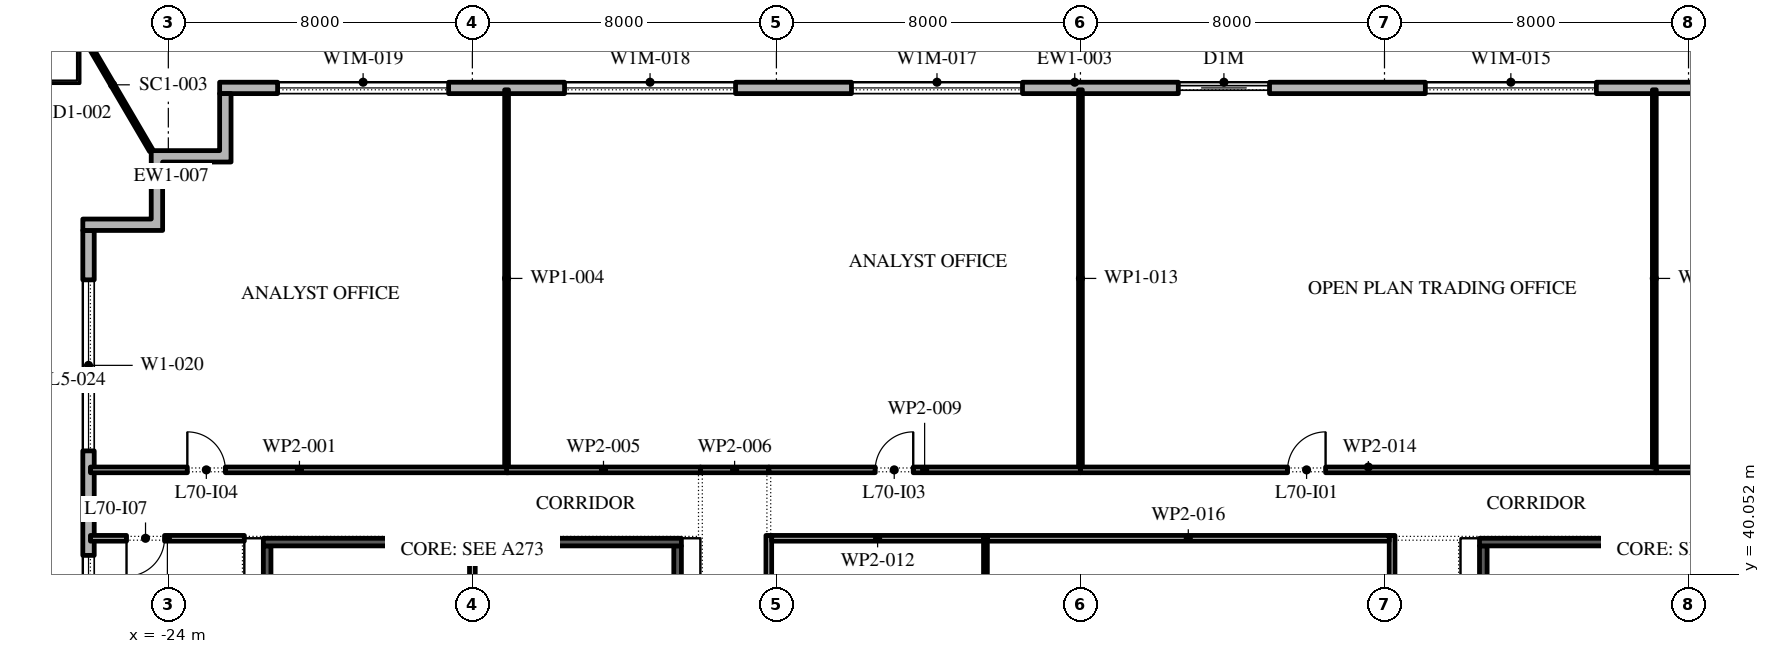
"""IFC4 building model, lengths in metres.
Left out: names, types, materials, properties, quantities, classifications, styles, units other than length and angle.
Written with IfcOpenShell. Run it as: python <this file> out.ifc"""

import sys

from ifc_helpers import new_model, si_unit, direction, frame, frame_2d, origin, place, context, subcontext, project, spatial, polyline, rectangle, outline, extrude, element, fill, save


model = new_model("IFC4")
c1 = context("Model", 3, precision=1e-05, world=origin(), true_north=direction((0.0, 1.0)))
c2 = subcontext(c1, "Body", "Model", "MODEL_VIEW")
j1 = project(units=[si_unit("LENGTHUNIT", "METRE"), si_unit("PLANEANGLEUNIT", "RADIAN")], contexts=[c1])
p1 = place(None, origin())
s1 = spatial("IfcSite", under=j1, at=p1, CompositionType="ELEMENT")
p2 = place(p1, origin())
s2 = spatial("IfcBuilding", under=s1, at=p2, CompositionType="ELEMENT")
p3 = place(p2, frame((0.0, 0.0, 321.6)))
s3 = spatial("IfcBuildingStorey", under=s2, at=p3, CompositionType="ELEMENT", Elevation=321.6)
p4 = place(p3, frame((22.35, 52.85, 0.0), z_axis=(0.0, 0.0, 1.0), x_axis=(-1.0, 0.0, 0.0)))
e1 = element("IfcWall", 1, at=p4, inside=s3, PredefinedType="STANDARD", context=c2, shape_type="SweptSolid", body=[
    extrude(rectangle(XDim=45.0, YDim=0.3, at=frame_2d((22.5, 0.0))), origin(), (0.0, 0.0, 1.0), 4.0),
])
p5 = place(p4, frame((1.375, 0.0, 0.45)))
e2 = element("IfcOpeningElement", 2, at=p5, cuts=e1, PredefinedType="OPENING", context=c2, shape_type="SweptSolid", body=[
    extrude(rectangle(XDim=4.5, YDim=2.575, at=frame_2d((2.25, 1.288))), frame((0.0, 0.16, 0.0), z_axis=(0.0, -1.0, 0.0), x_axis=(1.0, 0.0, 0.0)), (0.0, 0.0, 1.0), 0.32),
])
p6 = place(p4, frame((8.775, 0.0, 0.45)))
e3 = element("IfcOpeningElement", 3, at=p6, cuts=e1, PredefinedType="OPENING", context=c2, shape_type="SweptSolid", body=[
    extrude(rectangle(XDim=4.5, YDim=2.575, at=frame_2d((2.25, 1.288))), frame((0.0, 0.16, 0.0), z_axis=(0.0, -1.0, 0.0), x_axis=(1.0, 0.0, 0.0)), (0.0, 0.0, 1.0), 0.32),
])
p7 = place(p4, frame((17.375, 0.0, 0.0)))
e4 = element("IfcOpeningElement", 4, at=p7, cuts=e1, PredefinedType="OPENING", context=c2, shape_type="SweptSolid", body=[
    extrude(rectangle(XDim=2.4, YDim=3.025, at=frame_2d((1.2, 1.512))), frame((0.0, 0.16, 0.0), z_axis=(0.0, -1.0, 0.0), x_axis=(1.0, 0.0, 0.0)), (0.0, 0.0, 1.0), 0.32),
])
p8 = place(p4, frame((23.875, 0.0, 0.45)))
e5 = element("IfcOpeningElement", 5, at=p8, cuts=e1, PredefinedType="OPENING", context=c2, shape_type="SweptSolid", body=[
    extrude(rectangle(XDim=4.5, YDim=2.575, at=frame_2d((2.25, 1.288))), frame((0.0, 0.16, 0.0), z_axis=(0.0, -1.0, 0.0), x_axis=(1.0, 0.0, 0.0)), (0.0, 0.0, 1.0), 0.32),
])
p9 = place(p4, frame((31.425, 0.0, 0.45)))
e6 = element("IfcOpeningElement", 6, at=p9, cuts=e1, PredefinedType="OPENING", context=c2, shape_type="SweptSolid", body=[
    extrude(rectangle(XDim=4.5, YDim=2.575, at=frame_2d((2.25, 1.288))), frame((0.0, 0.16, 0.0), z_axis=(0.0, -1.0, 0.0), x_axis=(1.0, 0.0, 0.0)), (0.0, 0.0, 1.0), 0.32),
])
p10 = place(p4, frame((38.975, 0.0, 0.45)))
e7 = element("IfcOpeningElement", 7, at=p10, cuts=e1, PredefinedType="OPENING", context=c2, shape_type="SweptSolid", body=[
    extrude(rectangle(XDim=4.5, YDim=2.575, at=frame_2d((2.25, 1.288))), frame((0.0, 0.16, 0.0), z_axis=(0.0, -1.0, 0.0), x_axis=(1.0, 0.0, 0.0)), (0.0, 0.0, 1.0), 0.32),
])
p11 = place(p3, frame((-26.1, 49.1, 0.0), z_axis=(0.0, 0.0, 1.0), x_axis=(0.0, -1.0, 0.0)))
e8 = element("IfcWall", 8, at=p11, inside=s3, PredefinedType="STANDARD", context=c2, shape_type="SweptSolid", body=[
    extrude(rectangle(XDim=51.5, YDim=0.3, at=frame_2d((25.75, 0.0))), origin(), (0.0, 0.0, 1.0), 4.0),
])
p12 = place(p11, frame((1.3, 0.0, 0.45)))
e9 = element("IfcOpeningElement", 9, at=p12, cuts=e8, PredefinedType="OPENING", context=c2, shape_type="SweptSolid", body=[
    extrude(rectangle(XDim=4.5, YDim=3.05, at=frame_2d((2.25, 1.525))), frame((0.0, 0.16, 0.0), z_axis=(0.0, -1.0, 0.0), x_axis=(1.0, 0.0, 0.0)), (0.0, 0.0, 1.0), 0.32),
])
p13 = place(p11, frame((8.55, 0.0, 0.45)))
e10 = element("IfcOpeningElement", 10, at=p13, cuts=e8, PredefinedType="OPENING", context=c2, shape_type="SweptSolid", body=[
    extrude(rectangle(XDim=4.5, YDim=3.05, at=frame_2d((2.25, 1.525))), frame((0.0, 0.16, 0.0), z_axis=(0.0, -1.0, 0.0), x_axis=(1.0, 0.0, 0.0)), (0.0, 0.0, 1.0), 0.32),
])
p14 = place(p11, frame((17.0, 0.0, 0.0)))
e11 = element("IfcOpeningElement", 11, at=p14, cuts=e8, PredefinedType="OPENING", context=c2, shape_type="SweptSolid", body=[
    extrude(rectangle(XDim=2.4, YDim=3.5, at=frame_2d((1.2, 1.75))), frame((0.0, 0.16, 0.0), z_axis=(0.0, -1.0, 0.0), x_axis=(1.0, 0.0, 0.0)), (0.0, 0.0, 1.0), 0.32),
])
p15 = place(p11, frame((23.35, 0.0, 0.45)))
e12 = element("IfcOpeningElement", 12, at=p15, cuts=e8, PredefinedType="OPENING", context=c2, shape_type="SweptSolid", body=[
    extrude(rectangle(XDim=4.5, YDim=3.05, at=frame_2d((2.25, 1.525))), frame((0.0, 0.16, 0.0), z_axis=(0.0, -1.0, 0.0), x_axis=(1.0, 0.0, 0.0)), (0.0, 0.0, 1.0), 0.32),
])
p16 = place(p11, frame((30.75, 0.0, 0.45)))
e13 = element("IfcOpeningElement", 13, at=p16, cuts=e8, PredefinedType="OPENING", context=c2, shape_type="SweptSolid", body=[
    extrude(rectangle(XDim=4.5, YDim=3.05, at=frame_2d((2.25, 1.525))), frame((0.0, 0.16, 0.0), z_axis=(0.0, -1.0, 0.0), x_axis=(1.0, 0.0, 0.0)), (0.0, 0.0, 1.0), 0.32),
])
p17 = place(p11, frame((38.15, 0.0, 0.45)))
e14 = element("IfcOpeningElement", 14, at=p17, cuts=e8, PredefinedType="OPENING", context=c2, shape_type="SweptSolid", body=[
    extrude(rectangle(XDim=4.5, YDim=3.05, at=frame_2d((2.25, 1.525))), frame((0.0, 0.16, 0.0), z_axis=(0.0, -1.0, 0.0), x_axis=(1.0, 0.0, 0.0)), (0.0, 0.0, 1.0), 0.32),
])
p18 = place(p11, frame((46.6, 0.0, 0.0)))
e15 = element("IfcOpeningElement", 15, at=p18, cuts=e8, PredefinedType="OPENING", context=c2, shape_type="SweptSolid", body=[
    extrude(rectangle(XDim=2.4, YDim=3.5, at=frame_2d((1.2, 1.75))), frame((0.0, 0.16, 0.0), z_axis=(0.0, -1.0, 0.0), x_axis=(1.0, 0.0, 0.0)), (0.0, 0.0, 1.0), 0.32),
])
p19 = place(p3, origin())
e16 = element("IfcWall", 16, at=p19, inside=s3, PredefinedType="STANDARD", context=c2, shape_type="SweptSolid", body=[
    extrude(outline(polyline([(-24.45, 49.4), (-24.45, 51.2), (-22.65, 51.2), (-22.65, 52.7), (-22.35, 52.7), (-22.35, 50.9), (-24.15, 50.9), (-24.15, 49.1), (-26.25, 49.1), (-26.25, 49.4), (-24.45, 49.4)])), origin(), (0.0, 0.0, 1.0), 4.0),
])
p20 = place(p3, frame((-24.45, 51.2, -0.05), z_axis=(0.0, 0.0, 1.0), x_axis=(-0.506031495682, 0.862515000089, 0.0)))
e17 = element("IfcWall", 17, at=p20, inside=s3, PredefinedType="STANDARD", context=c2, shape_type="SweptSolid", body=[
    extrude(rectangle(XDim=4.016, YDim=0.1, at=frame_2d((2.008, 0.0))), origin(), (0.0, 0.0, 1.0), 4.05),
])
p21 = place(p3, frame((-21.4, 25.75, 0.0), z_axis=(0.0, 0.0, 1.0), x_axis=(0.0, 1.0, 0.0)))
e18 = element("IfcWall", 18, at=p21, inside=s3, PredefinedType="SHEAR", context=c2, shape_type="SweptSolid", body=[
    extrude(rectangle(XDim=15.05, YDim=0.2, at=frame_2d((7.525, 0.0))), origin(), (0.0, 0.0, 1.0), 4.0),
])
p22 = place(p21, frame((7.075, 0.0, 0.0)))
e19 = element("IfcOpeningElement", 19, at=p22, cuts=e18, PredefinedType="OPENING", context=c2, shape_type="SweptSolid", body=[
    extrude(rectangle(XDim=0.9, YDim=2.1, at=frame_2d((0.45, 1.05))), frame((0.0, 0.11, 0.0), z_axis=(0.0, -1.0, 0.0), x_axis=(1.0, 0.0, 0.0)), (0.0, 0.0, 1.0), 0.22),
])
p23 = place(p3, frame((-10.6, 25.75, 0.0), z_axis=(0.0, 0.0, 1.0), x_axis=(0.0, 1.0, 0.0)))
e20 = element("IfcWall", 20, at=p23, inside=s3, PredefinedType="SHEAR", context=c2, shape_type="SweptSolid", body=[
    extrude(rectangle(XDim=15.05, YDim=0.2, at=frame_2d((7.525, 0.0))), origin(), (0.0, 0.0, 1.0), 4.0),
])
p24 = place(p23, frame((7.075, 0.0, 0.0)))
e21 = element("IfcOpeningElement", 21, at=p24, cuts=e20, PredefinedType="OPENING", context=c2, shape_type="SweptSolid", body=[
    extrude(rectangle(XDim=0.9, YDim=2.1, at=frame_2d((0.45, 1.05))), frame((0.0, 0.11, 0.0), z_axis=(0.0, -1.0, 0.0), x_axis=(1.0, 0.0, 0.0)), (0.0, 0.0, 1.0), 0.22),
])
p25 = place(p3, frame((-21.5, 40.9, 0.0), z_axis=(0.0, 0.0, 1.0), x_axis=(1.0, 0.0, 0.0)))
e22 = element("IfcWall", 22, at=p25, inside=s3, PredefinedType="SHEAR", context=c2, shape_type="SweptSolid", body=[
    extrude(rectangle(XDim=11.0, YDim=0.2, at=frame_2d((5.5, 0.0))), origin(), (0.0, 0.0, 1.0), 4.0),
])
p26 = place(p3, frame((-16.0, 25.75, 0.0), z_axis=(0.0, 0.0, 1.0), x_axis=(0.0, 1.0, 0.0)))
e23 = element("IfcWall", 23, at=p26, inside=s3, PredefinedType="PARTITIONING", context=c2, shape_type="SweptSolid", body=[
    extrude(rectangle(XDim=15.05, YDim=0.15, at=frame_2d((7.525, 0.0))), origin(), (0.0, 0.0, 1.0), 4.0),
])
p27 = place(p3, frame((10.6, 25.75, 0.0), z_axis=(0.0, 0.0, 1.0), x_axis=(0.0, 1.0, 0.0)))
e24 = element("IfcWall", 24, at=p27, inside=s3, PredefinedType="SHEAR", context=c2, shape_type="SweptSolid", body=[
    extrude(rectangle(XDim=15.05, YDim=0.2, at=frame_2d((7.525, 0.0))), origin(), (0.0, 0.0, 1.0), 4.0),
])
p28 = place(p27, frame((7.075, 0.0, 0.0)))
e25 = element("IfcOpeningElement", 25, at=p28, cuts=e24, PredefinedType="OPENING", context=c2, shape_type="SweptSolid", body=[
    extrude(rectangle(XDim=0.9, YDim=2.1, at=frame_2d((0.45, 1.05))), frame((0.0, 0.11, 0.0), z_axis=(0.0, -1.0, 0.0), x_axis=(1.0, 0.0, 0.0)), (0.0, 0.0, 1.0), 0.22),
])
p29 = place(p3, frame((10.5, 40.9, 0.0), z_axis=(0.0, 0.0, 1.0), x_axis=(1.0, 0.0, 0.0)))
e26 = element("IfcWall", 26, at=p29, inside=s3, PredefinedType="SHEAR", context=c2, shape_type="SweptSolid", body=[
    extrude(rectangle(XDim=11.0, YDim=0.2, at=frame_2d((5.5, 0.0))), origin(), (0.0, 0.0, 1.0), 4.0),
])
p30 = place(p3, frame((-26.05, 42.8, 0.0), z_axis=(0.0, 0.0, 1.0), x_axis=(1.0, 0.0, 0.0)))
e27 = element("IfcWall", 27, at=p30, inside=s3, PredefinedType="PARTITIONING", context=c2, shape_type="SweptSolid", body=[
    extrude(rectangle(XDim=11.0, YDim=0.15, at=frame_2d((5.5, 0.0))), origin(), (0.0, 0.0, 1.0), 4.0),
])
p31 = place(p30, frame((2.55, 0.0, 0.0)))
e28 = element("IfcOpeningElement", 28, at=p31, cuts=e27, PredefinedType="OPENING", context=c2, shape_type="SweptSolid", body=[
    extrude(rectangle(XDim=1.0, YDim=2.1, at=frame_2d((0.5, 1.05))), frame((0.0, 0.085, 0.0), z_axis=(0.0, -1.0, 0.0), x_axis=(1.0, 0.0, 0.0)), (0.0, 0.0, 1.0), 0.17),
])
p32 = place(p3, frame((-22.0, 41.0, 0.0), z_axis=(0.0, 0.0, 1.0), x_axis=(-1.0, 0.0, 0.0)))
e29 = element("IfcWall", 29, at=p32, inside=s3, PredefinedType="PARTITIONING", context=c2, shape_type="SweptSolid", body=[
    extrude(rectangle(XDim=4.05, YDim=0.15, at=frame_2d((2.025, 0.0))), origin(), (0.0, 0.0, 1.0), 4.0),
])
p33 = place(p32, frame((2.1, 0.0, 0.0)))
e30 = element("IfcOpeningElement", 30, at=p33, cuts=e29, PredefinedType="OPENING", context=c2, shape_type="SweptSolid", body=[
    extrude(rectangle(XDim=1.0, YDim=2.1, at=frame_2d((0.5, 1.05))), frame((0.0, 0.085, 0.0), z_axis=(0.0, -1.0, 0.0), x_axis=(1.0, 0.0, 0.0)), (0.0, 0.0, 1.0), 0.17),
])
p34 = place(p3, frame((-15.1, 42.875, 0.0), z_axis=(0.0, 0.0, 1.0), x_axis=(0.0, 1.0, 0.0)))
e31 = element("IfcWall", 31, at=p34, inside=s3, PredefinedType="PARTITIONING", context=c2, shape_type="SweptSolid", body=[
    extrude(rectangle(XDim=9.925, YDim=0.1, at=frame_2d((4.962, 0.0))), origin(), (0.0, 0.0, 1.0), 4.0),
])
p35 = place(p3, frame((-15.1, 42.8, 0.0), z_axis=(0.0, 0.0, 1.0), x_axis=(1.0, 0.0, 0.0)))
e32 = element("IfcWall", 32, at=p35, inside=s3, PredefinedType="PARTITIONING", context=c2, shape_type="SweptSolid", body=[
    extrude(rectangle(XDim=5.1, YDim=0.15, at=frame_2d((2.55, 0.0))), origin(), (0.0, 0.0, 1.0), 4.0),
])
p36 = place(p3, frame((-10.0, 42.8, 0.0), z_axis=(0.0, 0.0, 1.0), x_axis=(1.0, 0.0, 0.0)))
e33 = element("IfcWall", 33, at=p36, inside=s3, PredefinedType="PARTITIONING", context=c2, shape_type="SweptSolid", body=[
    extrude(rectangle(XDim=1.8, YDim=0.15, at=frame_2d((0.9, 0.0))), origin(), (0.0, 0.0, 1.0), 4.0),
])
p37 = place(p3, frame((-8.2, 41.075, 0.0), z_axis=(0.0, 0.0, 1.0), x_axis=(0.0, -1.0, 0.0)))
e34 = element("IfcWall", 34, at=p37, inside=s3, PredefinedType="PARTITIONING", context=c2, shape_type="SweptSolid", body=[
    extrude(rectangle(XDim=22.0, YDim=0.15, at=frame_2d((11.0, 0.0))), origin(), (0.0, 0.0, 1.0), 4.0),
])
p38 = place(p37, frame((10.675, 0.0, 0.0)))
e35 = element("IfcOpeningElement", 35, at=p38, cuts=e34, PredefinedType="OPENING", context=c2, shape_type="SweptSolid", body=[
    extrude(rectangle(XDim=1.0, YDim=2.1, at=frame_2d((0.5, 1.05))), frame((0.0, 0.085, 0.0), z_axis=(0.0, -1.0, 0.0), x_axis=(1.0, 0.0, 0.0)), (0.0, 0.0, 1.0), 0.17),
])
p39 = place(p3, frame((-8.2, 42.8, 0.0), z_axis=(0.0, 0.0, 1.0), x_axis=(1.0, 0.0, 0.0)))
e36 = element("IfcWall", 36, at=p39, inside=s3, PredefinedType="PARTITIONING", context=c2, shape_type="SweptSolid", body=[
    extrude(rectangle(XDim=8.2, YDim=0.15, at=frame_2d((4.1, 0.0))), origin(), (0.0, 0.0, 1.0), 4.0),
])
p40 = place(p39, frame((2.8, 0.0, 0.0)))
e37 = element("IfcOpeningElement", 37, at=p40, cuts=e36, PredefinedType="OPENING", context=c2, shape_type="SweptSolid", body=[
    extrude(rectangle(XDim=1.0, YDim=2.1, at=frame_2d((0.5, 1.05))), frame((0.0, 0.085, 0.0), z_axis=(0.0, -1.0, 0.0), x_axis=(1.0, 0.0, 0.0)), (0.0, 0.0, 1.0), 0.17),
])
p41 = place(p3, frame((-2.5, 19.075, 0.0), z_axis=(0.0, 0.0, 1.0), x_axis=(0.0, 1.0, 0.0)))
e38 = element("IfcWall", 38, at=p41, inside=s3, PredefinedType="PARTITIONING", context=c2, shape_type="SweptSolid", body=[
    extrude(rectangle(XDim=22.0, YDim=0.1, at=frame_2d((11.0, 0.0))), origin(), (0.0, 0.0, 1.0), 4.0),
])
p42 = place(p3, frame((-2.55, 41.0, 0.0), z_axis=(0.0, 0.0, 1.0), x_axis=(-1.0, 0.0, 0.0)))
e39 = element("IfcWall", 39, at=p42, inside=s3, PredefinedType="PARTITIONING", context=c2, shape_type="SweptSolid", body=[
    extrude(rectangle(XDim=5.575, YDim=0.15, at=frame_2d((2.788, 0.0))), origin(), (0.0, 0.0, 1.0), 4.0),
])
p43 = place(p3, frame((0.0, 42.875, 0.0), z_axis=(0.0, 0.0, 1.0), x_axis=(0.0, 1.0, 0.0)))
e40 = element("IfcWall", 40, at=p43, inside=s3, PredefinedType="PARTITIONING", context=c2, shape_type="SweptSolid", body=[
    extrude(rectangle(XDim=9.925, YDim=0.1, at=frame_2d((4.962, 0.0))), origin(), (0.0, 0.0, 1.0), 4.0),
])
p44 = place(p3, frame((0.0, 42.8, 0.0), z_axis=(0.0, 0.0, 1.0), x_axis=(1.0, 0.0, 0.0)))
e41 = element("IfcWall", 41, at=p44, inside=s3, PredefinedType="PARTITIONING", context=c2, shape_type="SweptSolid", body=[
    extrude(rectangle(XDim=15.15, YDim=0.15, at=frame_2d((7.575, 0.0))), origin(), (0.0, 0.0, 1.0), 4.0),
])
p45 = place(p44, frame((5.45, 0.0, 0.0)))
e42 = element("IfcOpeningElement", 42, at=p45, cuts=e41, PredefinedType="OPENING", context=c2, shape_type="SweptSolid", body=[
    extrude(rectangle(XDim=1.0, YDim=2.1, at=frame_2d((0.5, 1.05))), frame((0.0, 0.085, 0.0), z_axis=(0.0, -1.0, 0.0), x_axis=(1.0, 0.0, 0.0)), (0.0, 0.0, 1.0), 0.17),
])
p46 = place(p3, frame((8.2, 19.075, 0.0), z_axis=(0.0, 0.0, 1.0), x_axis=(0.0, 1.0, 0.0)))
e43 = element("IfcWall", 43, at=p46, inside=s3, PredefinedType="PARTITIONING", context=c2, shape_type="SweptSolid", body=[
    extrude(rectangle(XDim=22.0, YDim=0.15, at=frame_2d((11.0, 0.0))), origin(), (0.0, 0.0, 1.0), 4.0),
])
p47 = place(p46, frame((7.725, 0.0, 0.0)))
e44 = element("IfcOpeningElement", 44, at=p47, cuts=e43, PredefinedType="OPENING", context=c2, shape_type="SweptSolid", body=[
    extrude(rectangle(XDim=1.8, YDim=2.1, at=frame_2d((0.9, 1.05))), frame((0.0, 0.085, 0.0), z_axis=(0.0, -1.0, 0.0), x_axis=(1.0, 0.0, 0.0)), (0.0, 0.0, 1.0), 0.17),
])
p48 = place(p3, frame((8.125, 41.0, 0.0), z_axis=(0.0, 0.0, 1.0), x_axis=(-1.0, 0.0, 0.0)))
e45 = element("IfcWall", 45, at=p48, inside=s3, PredefinedType="PARTITIONING", context=c2, shape_type="SweptSolid", body=[
    extrude(rectangle(XDim=10.575, YDim=0.15, at=frame_2d((5.288, 0.0))), origin(), (0.0, 0.0, 1.0), 4.0),
])
p49 = place(p3, frame((15.15, 42.8, 0.0), z_axis=(0.0, 0.0, 1.0), x_axis=(1.0, 0.0, 0.0)))
e46 = element("IfcWall", 46, at=p49, inside=s3, PredefinedType="PARTITIONING", context=c2, shape_type="SweptSolid", body=[
    extrude(rectangle(XDim=10.9, YDim=0.15, at=frame_2d((5.45, 0.0))), origin(), (0.0, 0.0, 1.0), 4.0),
])
p50 = place(p49, frame((7.2, 0.0, 0.0)))
e47 = element("IfcOpeningElement", 47, at=p50, cuts=e46, PredefinedType="OPENING", context=c2, shape_type="SweptSolid", body=[
    extrude(rectangle(XDim=1.0, YDim=2.1, at=frame_2d((0.5, 1.05))), frame((0.0, 0.085, 0.0), z_axis=(0.0, -1.0, 0.0), x_axis=(1.0, 0.0, 0.0)), (0.0, 0.0, 1.0), 0.17),
])
p51 = place(p3, frame((15.1, 52.8, 0.0), z_axis=(0.0, 0.0, 1.0), x_axis=(0.0, -1.0, 0.0)))
e48 = element("IfcWall", 48, at=p51, inside=s3, PredefinedType="PARTITIONING", context=c2, shape_type="SweptSolid", body=[
    extrude(rectangle(XDim=9.925, YDim=0.1, at=frame_2d((4.962, 0.0))), origin(), (0.0, 0.0, 1.0), 4.0),
])
p52 = place(p6, origin())
e49 = element("IfcWindow", 49, at=p52, inside=s3, PartitioningType="DOUBLE_PANEL_VERTICAL", PredefinedType="WINDOW", context=c2, shape_type="SweptSolid", body=[
    extrude(rectangle(XDim=4.5, YDim=2.575, at=frame_2d((2.25, 1.288))), frame((0.0, 0.03, 0.0), z_axis=(0.0, -1.0, 0.0), x_axis=(1.0, 0.0, 0.0)), (0.0, 0.0, 1.0), 0.06),
])
fill(e3, e49)
p53 = place(p7, origin())
e50 = element("IfcDoor", 50, at=p53, inside=s3, OperationType="DOUBLE_DOOR_SLIDING", PredefinedType="DOOR", context=c2, shape_type="SweptSolid", body=[
    extrude(rectangle(XDim=2.4, YDim=3.025, at=frame_2d((1.2, 1.512))), frame((0.0, 0.025, 0.0), z_axis=(0.0, -1.0, 0.0), x_axis=(1.0, 0.0, 0.0)), (0.0, 0.0, 1.0), 0.05),
])
fill(e4, e50)
p54 = place(p8, origin())
e51 = element("IfcWindow", 51, at=p54, inside=s3, PartitioningType="DOUBLE_PANEL_VERTICAL", PredefinedType="WINDOW", context=c2, shape_type="SweptSolid", body=[
    extrude(rectangle(XDim=4.5, YDim=2.575, at=frame_2d((2.25, 1.288))), frame((0.0, 0.03, 0.0), z_axis=(0.0, -1.0, 0.0), x_axis=(1.0, 0.0, 0.0)), (0.0, 0.0, 1.0), 0.06),
])
fill(e5, e51)
p55 = place(p9, origin())
e52 = element("IfcWindow", 52, at=p55, inside=s3, PartitioningType="DOUBLE_PANEL_VERTICAL", PredefinedType="WINDOW", context=c2, shape_type="SweptSolid", body=[
    extrude(rectangle(XDim=4.5, YDim=2.575, at=frame_2d((2.25, 1.288))), frame((0.0, 0.03, 0.0), z_axis=(0.0, -1.0, 0.0), x_axis=(1.0, 0.0, 0.0)), (0.0, 0.0, 1.0), 0.06),
])
fill(e6, e52)
p56 = place(p10, origin())
e53 = element("IfcWindow", 53, at=p56, inside=s3, PartitioningType="DOUBLE_PANEL_VERTICAL", PredefinedType="WINDOW", context=c2, shape_type="SweptSolid", body=[
    extrude(rectangle(XDim=4.5, YDim=2.575, at=frame_2d((2.25, 1.288))), frame((0.0, 0.03, 0.0), z_axis=(0.0, -1.0, 0.0), x_axis=(1.0, 0.0, 0.0)), (0.0, 0.0, 1.0), 0.06),
])
fill(e7, e53)
p57 = place(p12, origin())
e54 = element("IfcWindow", 54, at=p57, inside=s3, PartitioningType="DOUBLE_PANEL_VERTICAL", PredefinedType="WINDOW", context=c2, shape_type="SweptSolid", body=[
    extrude(rectangle(XDim=4.5, YDim=3.05, at=frame_2d((2.25, 1.525))), frame((0.0, 0.03, 0.0), z_axis=(0.0, -1.0, 0.0), x_axis=(1.0, 0.0, 0.0)), (0.0, 0.0, 1.0), 0.06),
])
fill(e9, e54)
p58 = place(p13, origin())
e55 = element("IfcWindow", 55, at=p58, inside=s3, PartitioningType="DOUBLE_PANEL_VERTICAL", PredefinedType="WINDOW", context=c2, shape_type="SweptSolid", body=[
    extrude(rectangle(XDim=4.5, YDim=3.05, at=frame_2d((2.25, 1.525))), frame((0.0, 0.03, 0.0), z_axis=(0.0, -1.0, 0.0), x_axis=(1.0, 0.0, 0.0)), (0.0, 0.0, 1.0), 0.06),
])
fill(e10, e55)
p59 = place(p45, origin())
e56 = element("IfcDoor", 56, at=p59, inside=s3, OperationType="SINGLE_SWING_LEFT", PredefinedType="DOOR", context=c2, shape_type="SweptSolid", body=[
    extrude(rectangle(XDim=1.0, YDim=2.1, at=frame_2d((0.5, 1.05))), frame((0.0, 0.025, 0.0), z_axis=(0.0, -1.0, 0.0), x_axis=(1.0, 0.0, 0.0)), (0.0, 0.0, 1.0), 0.05),
])
fill(e42, e56)
p60 = place(p40, origin())
e57 = element("IfcDoor", 57, at=p60, inside=s3, OperationType="SINGLE_SWING_LEFT", PredefinedType="DOOR", context=c2, shape_type="SweptSolid", body=[
    extrude(rectangle(XDim=1.0, YDim=2.1, at=frame_2d((0.5, 1.05))), frame((0.0, 0.025, 0.0), z_axis=(0.0, -1.0, 0.0), x_axis=(1.0, 0.0, 0.0)), (0.0, 0.0, 1.0), 0.05),
])
fill(e37, e57)
p61 = place(p31, origin())
e58 = element("IfcDoor", 58, at=p61, inside=s3, OperationType="SINGLE_SWING_RIGHT", PredefinedType="DOOR", context=c2, shape_type="SweptSolid", body=[
    extrude(rectangle(XDim=1.0, YDim=2.1, at=frame_2d((0.5, 1.05))), frame((0.0, 0.025, 0.0), z_axis=(0.0, -1.0, 0.0), x_axis=(1.0, 0.0, 0.0)), (0.0, 0.0, 1.0), 0.05),
])
fill(e28, e58)
p62 = place(p33, origin())
e59 = element("IfcDoor", 59, at=p62, inside=s3, OperationType="SINGLE_SWING_LEFT", PredefinedType="DOOR", context=c2, shape_type="SweptSolid", body=[
    extrude(rectangle(XDim=1.0, YDim=2.1, at=frame_2d((0.5, 1.05))), frame((0.0, 0.025, 0.0), z_axis=(0.0, -1.0, 0.0), x_axis=(1.0, 0.0, 0.0)), (0.0, 0.0, 1.0), 0.05),
])
fill(e30, e59)
save(model, sys.argv[1])
